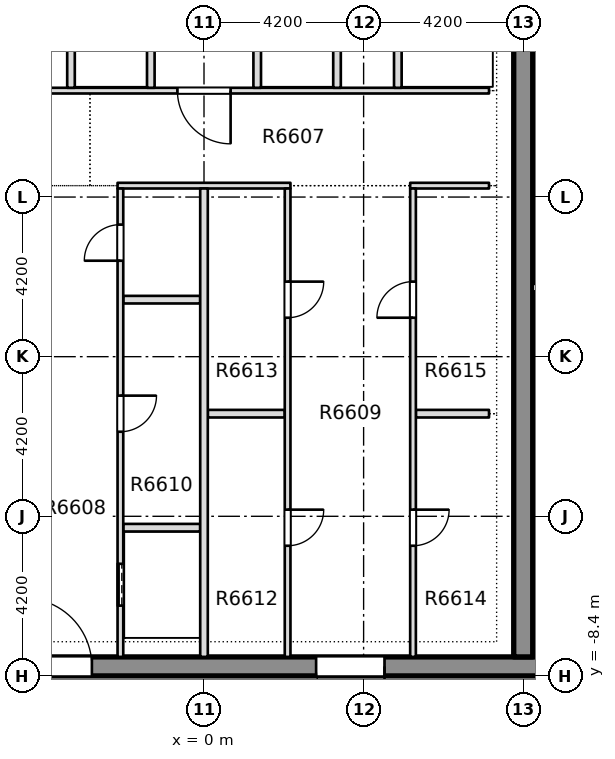
"""IFC4 building model, lengths in metres.
Left out: names, types, materials, properties, quantities, classifications, styles, units other than length and angle.
Written with IfcOpenShell. Run it as: python <this file> out.ifc"""

import sys

from ifc_helpers import new_model, si_unit, direction, frame, frame_2d, origin, place, context, subcontext, project, spatial, rectangle, extrude, element, fill, save


model = new_model("IFC4")
c1 = context("Model", 3, precision=1e-05, world=origin(), true_north=direction((0.0, 1.0)))
c2 = subcontext(c1, "Body", "Model", "MODEL_VIEW")
j1 = project(units=[si_unit("LENGTHUNIT", "METRE"), si_unit("PLANEANGLEUNIT", "RADIAN")], contexts=[c1])
p1 = place(None, origin())
s1 = spatial("IfcSite", under=j1, at=p1, CompositionType="ELEMENT")
p2 = place(p1, origin())
s2 = spatial("IfcBuilding", under=s1, at=p2, CompositionType="ELEMENT")
p3 = place(p2, frame((0.0, 0.0, 251.05)))
s3 = spatial("IfcBuildingStorey", under=s2, at=p3, CompositionType="ELEMENT", Elevation=251.05)
p4 = place(p3, frame((-12.1, -8.15, -0.4), z_axis=(0.0, 0.0, 1.0), x_axis=(1.0, 0.0, 0.0)))
e1 = element("IfcWall", 1, at=p4, inside=s3, PredefinedType="SHEAR", context=c2, shape_type="SweptSolid", body=[
    extrude(rectangle(XDim=24.2, YDim=0.5, at=frame_2d((12.1, 0.0))), origin(), (0.0, 0.0, 1.0), 3.45),
])
p5 = place(p4, frame((7.35, 0.0, 0.4)))
e2 = element("IfcOpeningElement", 2, at=p5, cuts=e1, PredefinedType="OPENING", context=c2, shape_type="SweptSolid", body=[
    extrude(rectangle(XDim=1.8, YDim=2.1, at=frame_2d((0.9, 1.05))), frame((0.0, 0.26, 0.0), z_axis=(0.0, -1.0, 0.0), x_axis=(1.0, 0.0, 0.0)), (0.0, 0.0, 1.0), 0.52),
])
p6 = place(p4, frame((15.05, 0.0, 0.4)))
e3 = element("IfcOpeningElement", 3, at=p6, cuts=e1, PredefinedType="OPENING", context=c2, shape_type="SweptSolid", body=[
    extrude(rectangle(XDim=1.8, YDim=2.1, at=frame_2d((0.9, 1.05))), frame((0.0, 0.26, 0.0), z_axis=(0.0, -1.0, 0.0), x_axis=(1.0, 0.0, 0.0)), (0.0, 0.0, 1.0), 0.52),
])
p7 = place(p3, frame((8.4, -7.9, -0.4), z_axis=(0.0, 0.0, 1.0), x_axis=(0.0, 1.0, 0.0)))
e4 = element("IfcWall", 4, at=p7, inside=s3, PredefinedType="SHEAR", context=c2, shape_type="SweptSolid", body=[
    extrude(rectangle(XDim=29.15, YDim=0.5, at=frame_2d((14.575, 0.0))), origin(), (0.0, 0.0, 1.0), 3.45),
])
p8 = place(p7, frame((18.8, 0.0, 0.4)))
e5 = element("IfcOpeningElement", 5, at=p8, cuts=e4, PredefinedType="OPENING", context=c2, shape_type="SweptSolid", body=[
    extrude(rectangle(XDim=1.2, YDim=2.1, at=frame_2d((0.6, 1.05))), frame((0.0, 0.26, 0.0), z_axis=(0.0, -1.0, 0.0), x_axis=(1.0, 0.0, 0.0)), (0.0, 0.0, 1.0), 0.52),
])
for number, where, z_axis, x_axis in (
    (6, (-2.125, -4.5, 0.0), (0.0, 0.0, 1.0), (1.0, 0.0, 0.0)),
    (7, (0.1, -1.5, 0.0), (0.0, 0.0, 1.0), (1.0, 0.0, 0.0)),
):
    element("IfcWall", number, at=place(p3, frame(where, z_axis=z_axis, x_axis=x_axis)), inside=s3, PredefinedType="PARTITIONING", context=c2, shape_type="SweptSolid", body=[
        extrude(rectangle(XDim=2.025, YDim=0.2, at=frame_2d((1.012, 0.0))), origin(), (0.0, 0.0, 1.0), 3.05),
    ])
p9 = place(p3, frame((5.575, -1.5, 0.0), z_axis=(0.0, 0.0, 1.0), x_axis=(1.0, 0.0, 0.0)))
e8 = element("IfcWall", 8, at=p9, inside=s3, PredefinedType="PARTITIONING", context=c2, shape_type="SweptSolid", body=[
    extrude(rectangle(XDim=1.925, YDim=0.2, at=frame_2d((0.962, 0.0))), origin(), (0.0, 0.0, 1.0), 3.05),
])
p10 = place(p3, frame((-2.125, 1.5, 0.0), z_axis=(0.0, 0.0, 1.0), x_axis=(1.0, 0.0, 0.0)))
e9 = element("IfcWall", 9, at=p10, inside=s3, PredefinedType="PARTITIONING", context=c2, shape_type="SweptSolid", body=[
    extrude(rectangle(XDim=2.025, YDim=0.2, at=frame_2d((1.012, 0.0))), origin(), (0.0, 0.0, 1.0), 3.05),
])
p11 = place(p3, frame((-2.275, 4.5, 0.0), z_axis=(0.0, 0.0, 1.0), x_axis=(1.0, 0.0, 0.0)))
e10 = element("IfcWall", 10, at=p11, inside=s3, PredefinedType="PARTITIONING", context=c2, shape_type="SweptSolid", body=[
    extrude(rectangle(XDim=4.55, YDim=0.15, at=frame_2d((2.275, 0.0))), origin(), (0.0, 0.0, 1.0), 3.05),
])
p12 = place(p3, frame((5.425, 4.5, 0.0), z_axis=(0.0, 0.0, 1.0), x_axis=(1.0, 0.0, 0.0)))
e11 = element("IfcWall", 11, at=p12, inside=s3, PredefinedType="PARTITIONING", context=c2, shape_type="SweptSolid", body=[
    extrude(rectangle(XDim=2.075, YDim=0.15, at=frame_2d((1.038, 0.0))), origin(), (0.0, 0.0, 1.0), 3.05),
])
p13 = place(p3, frame((-7.5, 7.0, 0.0), z_axis=(0.0, 0.0, 1.0), x_axis=(1.0, 0.0, 0.0)))
e12 = element("IfcWall", 12, at=p13, inside=s3, PredefinedType="PARTITIONING", context=c2, shape_type="SweptSolid", body=[
    extrude(rectangle(XDim=15.0, YDim=0.15, at=frame_2d((7.5, 0.0))), origin(), (0.0, 0.0, 1.0), 3.05),
])
p14 = place(p13, frame((6.8, 0.0, 0.0)))
e13 = element("IfcOpeningElement", 13, at=p14, cuts=e12, PredefinedType="OPENING", context=c2, shape_type="SweptSolid", body=[
    extrude(rectangle(XDim=1.4, YDim=2.1, at=frame_2d((0.7, 1.05))), frame((0.0, 0.085, 0.0), z_axis=(0.0, -1.0, 0.0), x_axis=(1.0, 0.0, 0.0)), (0.0, 0.0, 1.0), 0.17),
])
p15 = place(p3, frame((-3.5, 7.075, 0.0), z_axis=(0.0, 0.0, 1.0), x_axis=(0.0, 1.0, 0.0)))
e14 = element("IfcWall", 14, at=p15, inside=s3, PredefinedType="PARTITIONING", context=c2, shape_type="SweptSolid", body=[
    extrude(rectangle(XDim=2.85, YDim=0.2, at=frame_2d((1.425, 0.0))), origin(), (0.0, 0.0, 1.0), 3.05),
])
p16 = place(p3, frame((-2.2, -7.899, 0.0), z_axis=(0.0, 0.0, 1.0), x_axis=(0.0, 1.0, 0.0)))
e15 = element("IfcWall", 15, at=p16, inside=s3, PredefinedType="PARTITIONING", context=c2, shape_type="SweptSolid", body=[
    extrude(rectangle(XDim=12.324, YDim=0.15, at=frame_2d((6.162, 0.0))), origin(), (0.0, 0.0, 1.0), 3.05),
])
p17 = place(p16, frame((1.349, 0.0, 0.0)))
e16 = element("IfcOpeningElement", 16, at=p17, cuts=e15, PredefinedType="OPENING", context=c2, shape_type="SweptSolid", body=[
    extrude(rectangle(XDim=1.1, YDim=2.1, at=frame_2d((0.55, 1.05))), frame((0.0, 0.085, 0.0), z_axis=(0.0, -1.0, 0.0), x_axis=(1.0, 0.0, 0.0)), (0.0, 0.0, 1.0), 0.17),
])
p18 = place(p16, frame((5.924, 0.0, 0.0)))
e17 = element("IfcOpeningElement", 17, at=p18, cuts=e15, PredefinedType="OPENING", context=c2, shape_type="SweptSolid", body=[
    extrude(rectangle(XDim=0.95, YDim=2.1, at=frame_2d((0.475, 1.05))), frame((0.0, 0.085, 0.0), z_axis=(0.0, -1.0, 0.0), x_axis=(1.0, 0.0, 0.0)), (0.0, 0.0, 1.0), 0.17),
])
p19 = place(p16, frame((10.424, 0.0, 0.0)))
e18 = element("IfcOpeningElement", 18, at=p19, cuts=e15, PredefinedType="OPENING", context=c2, shape_type="SweptSolid", body=[
    extrude(rectangle(XDim=0.95, YDim=2.1, at=frame_2d((0.475, 1.05))), frame((0.0, 0.085, 0.0), z_axis=(0.0, -1.0, 0.0), x_axis=(1.0, 0.0, 0.0)), (0.0, 0.0, 1.0), 0.17),
])
p20 = place(p3, frame((-1.4, 7.075, 0.0), z_axis=(0.0, 0.0, 1.0), x_axis=(0.0, 1.0, 0.0)))
e19 = element("IfcWall", 19, at=p20, inside=s3, PredefinedType="PARTITIONING", context=c2, shape_type="SweptSolid", body=[
    extrude(rectangle(XDim=2.85, YDim=0.2, at=frame_2d((1.425, 0.0))), origin(), (0.0, 0.0, 1.0), 3.05),
])
p21 = place(p3, frame((0.0, -7.899, 0.0), z_axis=(0.0, 0.0, 1.0), x_axis=(0.0, 1.0, 0.0)))
e20 = element("IfcWall", 20, at=p21, inside=s3, PredefinedType="PARTITIONING", context=c2, shape_type="SweptSolid", body=[
    extrude(rectangle(XDim=12.324, YDim=0.2, at=frame_2d((6.162, 0.0))), origin(), (0.0, 0.0, 1.0), 3.05),
])
p22 = place(p3, frame((1.4, 7.075, 0.0), z_axis=(0.0, 0.0, 1.0), x_axis=(0.0, 1.0, 0.0)))
e21 = element("IfcWall", 21, at=p22, inside=s3, PredefinedType="PARTITIONING", context=c2, shape_type="SweptSolid", body=[
    extrude(rectangle(XDim=2.85, YDim=0.2, at=frame_2d((1.425, 0.0))), origin(), (0.0, 0.0, 1.0), 3.05),
])
p23 = place(p3, frame((2.2, -7.899, 0.0), z_axis=(0.0, 0.0, 1.0), x_axis=(0.0, 1.0, 0.0)))
e22 = element("IfcWall", 22, at=p23, inside=s3, PredefinedType="PARTITIONING", context=c2, shape_type="SweptSolid", body=[
    extrude(rectangle(XDim=12.324, YDim=0.15, at=frame_2d((6.162, 0.0))), origin(), (0.0, 0.0, 1.0), 3.05),
])
p24 = place(p23, frame((2.924, 0.0, 0.0)))
e23 = element("IfcOpeningElement", 23, at=p24, cuts=e22, PredefinedType="OPENING", context=c2, shape_type="SweptSolid", body=[
    extrude(rectangle(XDim=0.95, YDim=2.1, at=frame_2d((0.475, 1.05))), frame((0.0, 0.085, 0.0), z_axis=(0.0, -1.0, 0.0), x_axis=(1.0, 0.0, 0.0)), (0.0, 0.0, 1.0), 0.17),
])
p25 = place(p23, frame((8.924, 0.0, 0.0)))
e24 = element("IfcOpeningElement", 24, at=p25, cuts=e22, PredefinedType="OPENING", context=c2, shape_type="SweptSolid", body=[
    extrude(rectangle(XDim=0.95, YDim=2.1, at=frame_2d((0.475, 1.05))), frame((0.0, 0.085, 0.0), z_axis=(0.0, -1.0, 0.0), x_axis=(1.0, 0.0, 0.0)), (0.0, 0.0, 1.0), 0.17),
])
p26 = place(p3, frame((3.5, 7.075, 0.0), z_axis=(0.0, 0.0, 1.0), x_axis=(0.0, 1.0, 0.0)))
e25 = element("IfcWall", 25, at=p26, inside=s3, PredefinedType="PARTITIONING", context=c2, shape_type="SweptSolid", body=[
    extrude(rectangle(XDim=2.85, YDim=0.2, at=frame_2d((1.425, 0.0))), origin(), (0.0, 0.0, 1.0), 3.05),
])
p27 = place(p3, frame((5.1, 7.075, 0.0), z_axis=(0.0, 0.0, 1.0), x_axis=(0.0, 1.0, 0.0)))
e26 = element("IfcWall", 26, at=p27, inside=s3, PredefinedType="PARTITIONING", context=c2, shape_type="SweptSolid", body=[
    extrude(rectangle(XDim=2.725, YDim=0.2, at=frame_2d((1.363, 0.0))), origin(), (0.0, 0.0, 1.0), 3.05),
])
p28 = place(p3, frame((5.5, -7.899, 0.0), z_axis=(0.0, 0.0, 1.0), x_axis=(0.0, 1.0, 0.0)))
e27 = element("IfcWall", 27, at=p28, inside=s3, PredefinedType="PARTITIONING", context=c2, shape_type="SweptSolid", body=[
    extrude(rectangle(XDim=12.324, YDim=0.15, at=frame_2d((6.162, 0.0))), origin(), (0.0, 0.0, 1.0), 3.05),
])
p29 = place(p28, frame((2.924, 0.0, 0.0)))
e28 = element("IfcOpeningElement", 28, at=p29, cuts=e27, PredefinedType="OPENING", context=c2, shape_type="SweptSolid", body=[
    extrude(rectangle(XDim=0.95, YDim=2.1, at=frame_2d((0.475, 1.05))), frame((0.0, 0.085, 0.0), z_axis=(0.0, -1.0, 0.0), x_axis=(1.0, 0.0, 0.0)), (0.0, 0.0, 1.0), 0.17),
])
p30 = place(p28, frame((8.924, 0.0, 0.0)))
e29 = element("IfcOpeningElement", 29, at=p30, cuts=e27, PredefinedType="OPENING", context=c2, shape_type="SweptSolid", body=[
    extrude(rectangle(XDim=0.95, YDim=2.1, at=frame_2d((0.475, 1.05))), frame((0.0, 0.085, 0.0), z_axis=(0.0, -1.0, 0.0), x_axis=(1.0, 0.0, 0.0)), (0.0, 0.0, 1.0), 0.17),
])
p31 = place(p3, frame((8.651, 1.816, 0.0), z_axis=(0.0, 0.0, 1.0), x_axis=(1.0, 0.0, 0.0)))
e30 = element("IfcWall", 30, at=p31, inside=s3, PredefinedType="PARTITIONING", context=c2, shape_type="SweptSolid", body=[
    extrude(rectangle(XDim=3.448, YDim=0.2, at=frame_2d((1.724, 0.0))), origin(), (0.0, 0.0, 1.0), 3.05),
])
p32 = place(p17, origin())
e31 = element("IfcDoor", 31, at=p32, inside=s3, OperationType="SLIDING_TO_LEFT", PredefinedType="DOOR", context=c2, shape_type="SweptSolid", body=[
    extrude(rectangle(XDim=1.1, YDim=2.1, at=frame_2d((0.55, 1.05))), frame((0.0, 0.025, 0.0), z_axis=(0.0, -1.0, 0.0), x_axis=(1.0, 0.0, 0.0)), (0.0, 0.0, 1.0), 0.05),
])
fill(e16, e31)
p33 = place(p18, origin())
e32 = element("IfcDoor", 32, at=p33, inside=s3, OperationType="SINGLE_SWING_LEFT", PredefinedType="DOOR", context=c2, shape_type="SweptSolid", body=[
    extrude(rectangle(XDim=0.95, YDim=2.1, at=frame_2d((0.475, 1.05))), frame((0.0, 0.025, 0.0), z_axis=(0.0, -1.0, 0.0), x_axis=(1.0, 0.0, 0.0)), (0.0, 0.0, 1.0), 0.05),
])
fill(e17, e32)
p34 = place(p19, origin())
e33 = element("IfcDoor", 33, at=p34, inside=s3, OperationType="SINGLE_SWING_RIGHT", PredefinedType="DOOR", context=c2, shape_type="SweptSolid", body=[
    extrude(rectangle(XDim=0.95, YDim=2.1, at=frame_2d((0.475, 1.05))), frame((0.0, 0.025, 0.0), z_axis=(0.0, -1.0, 0.0), x_axis=(1.0, 0.0, 0.0)), (0.0, 0.0, 1.0), 0.05),
])
fill(e18, e33)
p35 = place(p24, origin())
e34 = element("IfcDoor", 34, at=p35, inside=s3, OperationType="SINGLE_SWING_RIGHT", PredefinedType="DOOR", context=c2, shape_type="SweptSolid", body=[
    extrude(rectangle(XDim=0.95, YDim=2.1, at=frame_2d((0.475, 1.05))), frame((0.0, 0.025, 0.0), z_axis=(0.0, -1.0, 0.0), x_axis=(1.0, 0.0, 0.0)), (0.0, 0.0, 1.0), 0.05),
])
fill(e23, e34)
p36 = place(p25, origin())
e35 = element("IfcDoor", 35, at=p36, inside=s3, OperationType="SINGLE_SWING_RIGHT", PredefinedType="DOOR", context=c2, shape_type="SweptSolid", body=[
    extrude(rectangle(XDim=0.95, YDim=2.1, at=frame_2d((0.475, 1.05))), frame((0.0, 0.025, 0.0), z_axis=(0.0, -1.0, 0.0), x_axis=(1.0, 0.0, 0.0)), (0.0, 0.0, 1.0), 0.05),
])
fill(e24, e35)
p37 = place(p29, origin())
e36 = element("IfcDoor", 36, at=p37, inside=s3, OperationType="SINGLE_SWING_LEFT", PredefinedType="DOOR", context=c2, shape_type="SweptSolid", body=[
    extrude(rectangle(XDim=0.95, YDim=2.1, at=frame_2d((0.475, 1.05))), frame((0.0, 0.025, 0.0), z_axis=(0.0, -1.0, 0.0), x_axis=(1.0, 0.0, 0.0)), (0.0, 0.0, 1.0), 0.05),
])
fill(e28, e36)
p38 = place(p30, origin())
e37 = element("IfcDoor", 37, at=p38, inside=s3, OperationType="SINGLE_SWING_LEFT", PredefinedType="DOOR", context=c2, shape_type="SweptSolid", body=[
    extrude(rectangle(XDim=0.95, YDim=2.1, at=frame_2d((0.475, 1.05))), frame((0.0, 0.025, 0.0), z_axis=(0.0, -1.0, 0.0), x_axis=(1.0, 0.0, 0.0)), (0.0, 0.0, 1.0), 0.05),
])
fill(e29, e37)
p39 = place(p14, origin())
e38 = element("IfcDoor", 38, at=p39, inside=s3, OperationType="SINGLE_SWING_RIGHT", PredefinedType="DOOR", context=c2, shape_type="SweptSolid", body=[
    extrude(rectangle(XDim=1.4, YDim=2.1, at=frame_2d((0.7, 1.05))), frame((0.0, 0.025, 0.0), z_axis=(0.0, -1.0, 0.0), x_axis=(1.0, 0.0, 0.0)), (0.0, 0.0, 1.0), 0.05),
])
fill(e13, e38)
p40 = place(p5, origin())
e39 = element("IfcDoor", 39, at=p40, inside=s3, OperationType="SINGLE_SWING_LEFT", PredefinedType="DOOR", context=c2, shape_type="SweptSolid", body=[
    extrude(rectangle(XDim=1.8, YDim=2.1, at=frame_2d((0.9, 1.05))), frame((0.0, 0.025, 0.0), z_axis=(0.0, -1.0, 0.0), x_axis=(1.0, 0.0, 0.0)), (0.0, 0.0, 1.0), 0.05),
])
fill(e2, e39)
p41 = place(p6, origin())
e40 = element("IfcDoor", 40, at=p41, inside=s3, OperationType="SINGLE_SWING_LEFT", PredefinedType="DOOR", context=c2, shape_type="SweptSolid", body=[
    extrude(rectangle(XDim=1.8, YDim=2.1, at=frame_2d((0.9, 1.05))), frame((0.0, 0.025, 0.0), z_axis=(0.0, -1.0, 0.0), x_axis=(1.0, 0.0, 0.0)), (0.0, 0.0, 1.0), 0.05),
])
fill(e3, e40)
save(model, sys.argv[1])
